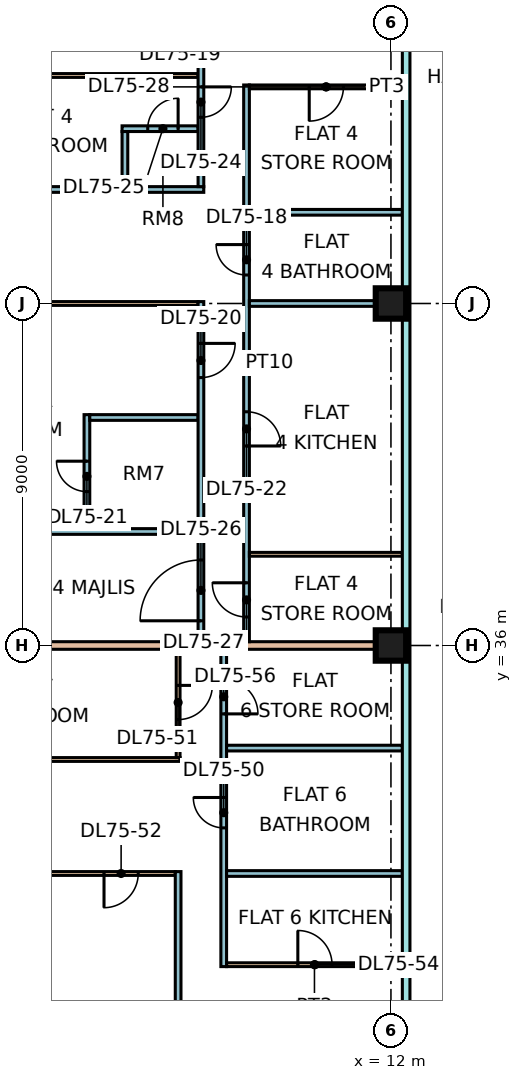
"""IFC4 building model, lengths in metres.
Left out: names, types, materials, properties, quantities, classifications, styles, units other than length and angle.
Written with IfcOpenShell. Run it as: python <this file> out.ifc"""

import sys

from ifc_helpers import new_model, si_unit, direction, frame, frame_2d, origin, origin_2d, place, context, subcontext, project, spatial, rectangle, extrude, element, fill, save


model = new_model("IFC4")
c1 = context("Model", 3, precision=1e-05, world=origin(), true_north=direction((0.0, 1.0)))
c2 = subcontext(c1, "Body", "Model", "MODEL_VIEW")
j1 = project(units=[si_unit("LENGTHUNIT", "METRE"), si_unit("PLANEANGLEUNIT", "RADIAN")], contexts=[c1])
p1 = place(None, origin())
s1 = spatial("IfcSite", under=j1, at=p1, CompositionType="ELEMENT")
p2 = place(p1, origin())
s2 = spatial("IfcBuilding", under=s1, at=p2, CompositionType="ELEMENT")
p3 = place(p2, frame((0.0, 0.0, 318.4)))
s3 = spatial("IfcBuildingStorey", under=s2, at=p3, CompositionType="ELEMENT", Elevation=318.4)
for number, where, z_axis, x_axis in (
    (1, (12.0, 36.0, 0.0), (0.0, 0.0, 1.0), (1.0, 0.0, 0.0)),
    (2, (12.0, 45.0, 0.0), (0.0, 0.0, 1.0), (1.0, 0.0, 0.0)),
):
    element("IfcColumn", number, at=place(p3, frame(where, z_axis=z_axis, x_axis=x_axis)), inside=s3, PredefinedType="COLUMN", context=c2, shape_type="SweptSolid", body=[
        extrude(rectangle(XDim=0.8, YDim=0.8, at=origin_2d()), origin(), (0.0, 0.0, 1.0), 3.75),
    ])
p4 = place(p3, frame((-1.351, 51.0, 0.0), z_axis=(0.0, 0.0, 1.0), x_axis=(1.0, 0.0, 0.0)))
e3 = element("IfcWall", 3, at=p4, inside=s3, PredefinedType="PARTITIONING", context=c2, shape_type="SweptSolid", body=[
    extrude(rectangle(XDim=8.276, YDim=0.1, at=frame_2d((4.138, 0.0))), origin(), (0.0, 0.0, 1.0), 3.3),
])
p5 = place(p3, frame((-1.35, 30.0, 0.0), z_axis=(0.0, 0.0, 1.0), x_axis=(1.0, 0.0, 0.0)))
e4 = element("IfcWall", 4, at=p5, inside=s3, PredefinedType="PARTITIONING", context=c2, shape_type="SweptSolid", body=[
    extrude(rectangle(XDim=7.675, YDim=0.1, at=frame_2d((3.837, 0.0))), origin(), (0.0, 0.0, 1.0), 3.3),
])
p6 = place(p5, frame((5.8, 0.0, 0.0)))
e5 = element("IfcOpeningElement", 5, at=p6, cuts=e4, PredefinedType="OPENING", context=c2, shape_type="SweptSolid", body=[
    extrude(rectangle(XDim=0.9, YDim=2.1, at=frame_2d((0.45, 1.05))), frame((0.0, 0.06, 0.0), z_axis=(0.0, -1.0, 0.0), x_axis=(1.0, 0.0, 0.0)), (0.0, 0.0, 1.0), 0.12),
])
p7 = place(p3, frame((-1.35, 33.0, 0.0), z_axis=(0.0, 0.0, 1.0), x_axis=(1.0, 0.0, 0.0)))
e6 = element("IfcWall", 6, at=p7, inside=s3, PredefinedType="PARTITIONING", context=c2, shape_type="SweptSolid", body=[
    extrude(rectangle(XDim=7.8, YDim=0.1, at=frame_2d((3.9, 0.0))), origin(), (0.0, 0.0, 1.0), 3.3),
])
p8 = place(p3, frame((0.0, 36.0, 0.0), z_axis=(0.0, 0.0, 1.0), x_axis=(1.0, 0.0, 0.0)))
e7 = element("IfcWall", 7, at=p8, inside=s3, PredefinedType="PARTITIONING", context=c2, shape_type="SweptSolid", body=[
    extrude(rectangle(XDim=12.3, YDim=0.2, at=frame_2d((6.15, 0.0))), origin(), (0.0, 0.0, 1.0), 3.3),
])
p9 = place(p3, frame((0.0, 48.0, 0.0), z_axis=(0.0, 0.0, 1.0), x_axis=(1.0, 0.0, 0.0)))
e8 = element("IfcWall", 8, at=p9, inside=s3, PredefinedType="PARTITIONING", context=c2, shape_type="SweptSolid", body=[
    extrude(rectangle(XDim=7.075, YDim=0.15, at=frame_2d((3.538, 0.0))), origin(), (0.0, 0.0, 1.0), 3.3),
])
p10 = place(p3, frame((0.074, 39.0, 0.0), z_axis=(0.0, 0.0, 1.0), x_axis=(1.0, 0.0, 0.0)))
e9 = element("IfcWall", 9, at=p10, inside=s3, PredefinedType="PARTITIONING", context=c2, shape_type="SweptSolid", body=[
    extrude(rectangle(XDim=6.851, YDim=0.15, at=frame_2d((3.426, 0.0))), origin(), (0.0, 0.0, 1.0), 3.3),
])
p11 = place(p3, frame((0.074, 45.0, 0.0), z_axis=(0.0, 0.0, 1.0), x_axis=(1.0, 0.0, 0.0)))
e10 = element("IfcWall", 10, at=p11, inside=s3, PredefinedType="PARTITIONING", context=c2, shape_type="SweptSolid", body=[
    extrude(rectangle(XDim=6.851, YDim=0.1, at=frame_2d((3.426, 0.0))), origin(), (0.0, 0.0, 1.0), 3.3),
])
p12 = place(p3, frame((4.0, 39.075, 0.0), z_axis=(0.0, 0.0, 1.0), x_axis=(0.0, 1.0, 0.0)))
e11 = element("IfcWall", 11, at=p12, inside=s3, PredefinedType="PARTITIONING", context=c2, shape_type="SweptSolid", body=[
    extrude(rectangle(XDim=3.0, YDim=0.15, at=frame_2d((1.5, 0.0))), origin(), (0.0, 0.0, 1.0), 3.3),
])
p13 = place(p12, frame((0.975, 0.0, 0.0)))
e12 = element("IfcOpeningElement", 12, at=p13, cuts=e11, PredefinedType="OPENING", context=c2, shape_type="SweptSolid", body=[
    extrude(rectangle(XDim=0.8, YDim=2.1, at=frame_2d((0.4, 1.05))), frame((0.0, 0.085, 0.0), z_axis=(0.0, -1.0, 0.0), x_axis=(1.0, 0.0, 0.0)), (0.0, 0.0, 1.0), 0.17),
])
p14 = place(p3, frame((4.075, 42.0, 0.0), z_axis=(0.0, 0.0, 1.0), x_axis=(1.0, 0.0, 0.0)))
e13 = element("IfcWall", 13, at=p14, inside=s3, PredefinedType="PARTITIONING", context=c2, shape_type="SweptSolid", body=[
    extrude(rectangle(XDim=2.85, YDim=0.15, at=frame_2d((1.425, 0.0))), origin(), (0.0, 0.0, 1.0), 3.3),
])
p15 = place(p3, frame((4.925, 49.6, 0.0), z_axis=(0.0, 0.0, 1.0), x_axis=(1.0, 0.0, 0.0)))
e14 = element("IfcWall", 14, at=p15, inside=s3, PredefinedType="PARTITIONING", context=c2, shape_type="SweptSolid", body=[
    extrude(rectangle(XDim=2.0, YDim=0.15, at=frame_2d((1.0, 0.0))), origin(), (0.0, 0.0, 1.0), 3.3),
])
p16 = place(p15, frame((0.675, 0.0, 0.0)))
e15 = element("IfcOpeningElement", 15, at=p16, cuts=e14, PredefinedType="OPENING", context=c2, shape_type="SweptSolid", body=[
    extrude(rectangle(XDim=0.8, YDim=2.1, at=frame_2d((0.4, 1.05))), frame((0.0, 0.085, 0.0), z_axis=(0.0, -1.0, 0.0), x_axis=(1.0, 0.0, 0.0)), (0.0, 0.0, 1.0), 0.17),
])
p17 = place(p3, frame((5.0, 48.075, 0.0), z_axis=(0.0, 0.0, 1.0), x_axis=(0.0, 1.0, 0.0)))
e16 = element("IfcWall", 16, at=p17, inside=s3, PredefinedType="PARTITIONING", context=c2, shape_type="SweptSolid", body=[
    extrude(rectangle(XDim=1.45, YDim=0.15, at=frame_2d((0.725, 0.0))), origin(), (0.0, 0.0, 1.0), 3.3),
])
p18 = place(p3, frame((6.4, 22.5, 0.0), z_axis=(0.0, 0.0, 1.0), x_axis=(0.0, 1.0, 0.0)))
e17 = element("IfcWall", 17, at=p18, inside=s3, PredefinedType="PARTITIONING", context=c2, shape_type="SweptSolid", body=[
    extrude(rectangle(XDim=7.55, YDim=0.15, at=frame_2d((3.775, 0.0))), origin(), (0.0, 0.0, 1.0), 3.3),
])
p19 = place(p3, frame((6.4, 33.05, 0.0), z_axis=(0.0, 0.0, 1.0), x_axis=(0.0, 1.0, 0.0)))
e18 = element("IfcWall", 18, at=p19, inside=s3, PredefinedType="PARTITIONING", context=c2, shape_type="SweptSolid", body=[
    extrude(rectangle(XDim=2.85, YDim=0.1, at=frame_2d((1.425, 0.0))), origin(), (0.0, 0.0, 1.0), 3.3),
])
p20 = place(p19, frame((1.0, 0.0, 0.0)))
e19 = element("IfcOpeningElement", 19, at=p20, cuts=e18, PredefinedType="OPENING", context=c2, shape_type="SweptSolid", body=[
    extrude(rectangle(XDim=0.9, YDim=2.1, at=frame_2d((0.45, 1.05))), frame((0.0, 0.06, 0.0), z_axis=(0.0, -1.0, 0.0), x_axis=(1.0, 0.0, 0.0)), (0.0, 0.0, 1.0), 0.12),
])
p21 = place(p3, frame((7.0, 36.1, 0.0), z_axis=(0.0, 0.0, 1.0), x_axis=(0.0, 1.0, 0.0)))
e20 = element("IfcWall", 20, at=p21, inside=s3, PredefinedType="PARTITIONING", context=c2, shape_type="SweptSolid", body=[
    extrude(rectangle(XDim=8.95, YDim=0.15, at=frame_2d((4.475, 0.0))), origin(), (0.0, 0.0, 1.0), 3.3),
])
p22 = place(p21, frame((6.95, 0.0, 0.0)))
e21 = element("IfcOpeningElement", 21, at=p22, cuts=e20, PredefinedType="OPENING", context=c2, shape_type="SweptSolid", body=[
    extrude(rectangle(XDim=0.9, YDim=2.1, at=frame_2d((0.45, 1.05))), frame((0.0, 0.085, 0.0), z_axis=(0.0, -1.0, 0.0), x_axis=(1.0, 0.0, 0.0)), (0.0, 0.0, 1.0), 0.17),
])
p23 = place(p21, frame((0.55, 0.0, 0.0)))
e22 = element("IfcOpeningElement", 22, at=p23, cuts=e20, PredefinedType="OPENING", context=c2, shape_type="SweptSolid", body=[
    extrude(rectangle(XDim=1.6, YDim=2.1, at=frame_2d((0.8, 1.05))), frame((0.0, 0.085, 0.0), z_axis=(0.0, -1.0, 0.0), x_axis=(1.0, 0.0, 0.0)), (0.0, 0.0, 1.0), 0.17),
])
p24 = place(p3, frame((7.0, 48.075, 0.0), z_axis=(0.0, 0.0, 1.0), x_axis=(0.0, 1.0, 0.0)))
e23 = element("IfcWall", 23, at=p24, inside=s3, PredefinedType="PARTITIONING", context=c2, shape_type="SweptSolid", body=[
    extrude(rectangle(XDim=7.275, YDim=0.15, at=frame_2d((3.638, 0.0))), origin(), (0.0, 0.0, 1.0), 3.3),
])
p25 = place(p24, frame((3.975, 0.0, 0.0)))
e24 = element("IfcOpeningElement", 24, at=p25, cuts=e23, PredefinedType="OPENING", context=c2, shape_type="SweptSolid", body=[
    extrude(rectangle(XDim=0.9, YDim=2.1, at=frame_2d((0.45, 1.05))), frame((0.0, 0.085, 0.0), z_axis=(0.0, -1.0, 0.0), x_axis=(1.0, 0.0, 0.0)), (0.0, 0.0, 1.0), 0.17),
])
p26 = place(p24, frame((1.825, 0.0, 0.0)))
e25 = element("IfcOpeningElement", 25, at=p26, cuts=e23, PredefinedType="OPENING", context=c2, shape_type="SweptSolid", body=[
    extrude(rectangle(XDim=0.8, YDim=2.1, at=frame_2d((0.4, 1.05))), frame((0.0, 0.085, 0.0), z_axis=(0.0, -1.0, 0.0), x_axis=(1.0, 0.0, 0.0)), (0.0, 0.0, 1.0), 0.17),
])
p27 = place(p3, frame((7.6, 27.55, 0.0), z_axis=(0.0, 0.0, 1.0), x_axis=(0.0, 1.0, 0.0)))
e26 = element("IfcWall", 26, at=p27, inside=s3, PredefinedType="PARTITIONING", context=c2, shape_type="SweptSolid", body=[
    extrude(rectangle(XDim=8.35, YDim=0.15, at=frame_2d((4.175, 0.0))), origin(), (0.0, 0.0, 1.0), 3.3),
])
p28 = place(p27, frame((3.65, 0.0, 0.0)))
e27 = element("IfcOpeningElement", 27, at=p28, cuts=e26, PredefinedType="OPENING", context=c2, shape_type="SweptSolid", body=[
    extrude(rectangle(XDim=0.8, YDim=2.1, at=frame_2d((0.4, 1.05))), frame((0.0, 0.085, 0.0), z_axis=(0.0, -1.0, 0.0), x_axis=(1.0, 0.0, 0.0)), (0.0, 0.0, 1.0), 0.17),
])
p29 = place(p27, frame((6.65, 0.0, 0.0)))
e28 = element("IfcOpeningElement", 28, at=p29, cuts=e26, PredefinedType="OPENING", context=c2, shape_type="SweptSolid", body=[
    extrude(rectangle(XDim=0.9, YDim=2.1, at=frame_2d((0.45, 1.05))), frame((0.0, 0.085, 0.0), z_axis=(0.0, -1.0, 0.0), x_axis=(1.0, 0.0, 0.0)), (0.0, 0.0, 1.0), 0.17),
])
p30 = place(p3, frame((7.675, 27.6, 0.0), z_axis=(0.0, 0.0, 1.0), x_axis=(1.0, 0.0, 0.0)))
e29 = element("IfcWall", 29, at=p30, inside=s3, PredefinedType="PARTITIONING", context=c2, shape_type="SweptSolid", body=[
    extrude(rectangle(XDim=4.625, YDim=0.1, at=frame_2d((2.312, 0.0))), origin(), (0.0, 0.0, 1.0), 3.3),
])
p31 = place(p30, frame((1.875, 0.0, 0.0)))
e30 = element("IfcOpeningElement", 30, at=p31, cuts=e29, PredefinedType="OPENING", context=c2, shape_type="SweptSolid", body=[
    extrude(rectangle(XDim=0.9, YDim=2.1, at=frame_2d((0.45, 1.05))), frame((0.0, 0.06, 0.0), z_axis=(0.0, -1.0, 0.0), x_axis=(1.0, 0.0, 0.0)), (0.0, 0.0, 1.0), 0.12),
])
for number, where, z_axis, x_axis in (
    (31, (7.675, 30.0, 0.0), (0.0, 0.0, 1.0), (1.0, 0.0, 0.0)),
    (32, (7.675, 33.3, 0.0), (0.0, 0.0, 1.0), (1.0, 0.0, 0.0)),
):
    element("IfcWall", number, at=place(p3, frame(where, z_axis=z_axis, x_axis=x_axis)), inside=s3, PredefinedType="PARTITIONING", context=c2, shape_type="SweptSolid", body=[
        extrude(rectangle(XDim=4.625, YDim=0.15, at=frame_2d((2.312, 0.0))), origin(), (0.0, 0.0, 1.0), 3.3),
    ])
p32 = place(p3, frame((8.2, 36.1, 0.0), z_axis=(0.0, 0.0, 1.0), x_axis=(0.0, 1.0, 0.0)))
e33 = element("IfcWall", 33, at=p32, inside=s3, PredefinedType="PARTITIONING", context=c2, shape_type="SweptSolid", body=[
    extrude(rectangle(XDim=14.65, YDim=0.15, at=frame_2d((7.325, 0.0))), origin(), (0.0, 0.0, 1.0), 3.3),
])
p33 = place(p32, frame((9.65, 0.0, 0.0)))
e34 = element("IfcOpeningElement", 34, at=p33, cuts=e33, PredefinedType="OPENING", context=c2, shape_type="SweptSolid", body=[
    extrude(rectangle(XDim=0.8, YDim=2.1, at=frame_2d((0.4, 1.05))), frame((0.0, 0.085, 0.0), z_axis=(0.0, -1.0, 0.0), x_axis=(1.0, 0.0, 0.0)), (0.0, 0.0, 1.0), 0.17),
])
p34 = place(p32, frame((5.15, 0.0, 0.0)))
e35 = element("IfcOpeningElement", 35, at=p34, cuts=e33, PredefinedType="OPENING", context=c2, shape_type="SweptSolid", body=[
    extrude(rectangle(XDim=0.9, YDim=2.1, at=frame_2d((0.45, 1.05))), frame((0.0, 0.085, 0.0), z_axis=(0.0, -1.0, 0.0), x_axis=(1.0, 0.0, 0.0)), (0.0, 0.0, 1.0), 0.17),
])
p35 = place(p32, frame((0.65, 0.0, 0.0)))
e36 = element("IfcOpeningElement", 36, at=p35, cuts=e33, PredefinedType="OPENING", context=c2, shape_type="SweptSolid", body=[
    extrude(rectangle(XDim=0.9, YDim=2.1, at=frame_2d((0.45, 1.05))), frame((0.0, 0.085, 0.0), z_axis=(0.0, -1.0, 0.0), x_axis=(1.0, 0.0, 0.0)), (0.0, 0.0, 1.0), 0.17),
])
p36 = place(p3, frame((8.275, 38.4, 0.0), z_axis=(0.0, 0.0, 1.0), x_axis=(1.0, 0.0, 0.0)))
e37 = element("IfcWall", 37, at=p36, inside=s3, PredefinedType="PARTITIONING", context=c2, shape_type="SweptSolid", body=[
    extrude(rectangle(XDim=4.025, YDim=0.1, at=frame_2d((2.013, 0.0))), origin(), (0.0, 0.0, 1.0), 3.3),
])
for number, where, z_axis, x_axis in (
    (38, (8.275, 45.0, 0.0), (0.0, 0.0, 1.0), (1.0, 0.0, 0.0)),
    (39, (8.275, 47.4, 0.0), (0.0, 0.0, 1.0), (1.0, 0.0, 0.0)),
):
    element("IfcWall", number, at=place(p3, frame(where, z_axis=z_axis, x_axis=x_axis)), inside=s3, PredefinedType="PARTITIONING", context=c2, shape_type="SweptSolid", body=[
        extrude(rectangle(XDim=4.025, YDim=0.15, at=frame_2d((2.013, 0.0))), origin(), (0.0, 0.0, 1.0), 3.3),
    ])
p37 = place(p3, frame((8.275, 50.7, 0.0), z_axis=(0.0, 0.0, 1.0), x_axis=(1.0, 0.0, 0.0)))
e40 = element("IfcWall", 40, at=p37, inside=s3, PredefinedType="PARTITIONING", context=c2, shape_type="SweptSolid", body=[
    extrude(rectangle(XDim=4.025, YDim=0.1, at=frame_2d((2.013, 0.0))), origin(), (0.0, 0.0, 1.0), 3.3),
])
p38 = place(p37, frame((1.575, 0.0, 0.0)))
e41 = element("IfcOpeningElement", 41, at=p38, cuts=e40, PredefinedType="OPENING", context=c2, shape_type="SweptSolid", body=[
    extrude(rectangle(XDim=0.9, YDim=2.1, at=frame_2d((0.45, 1.05))), frame((0.0, 0.06, 0.0), z_axis=(0.0, -1.0, 0.0), x_axis=(1.0, 0.0, 0.0)), (0.0, 0.0, 1.0), 0.12),
])
p39 = place(p3, frame((12.4, 20.0, 0.0), z_axis=(0.0, 0.0, 1.0), x_axis=(0.0, 1.0, 0.0)))
e42 = element("IfcWall", 42, at=p39, inside=s3, PredefinedType="PARTITIONING", context=c2, shape_type="SweptSolid", body=[
    extrude(rectangle(XDim=33.926, YDim=0.2, at=frame_2d((16.963, 0.0))), origin(), (0.0, 0.0, 1.0), 3.3),
])
p40 = place(p39, frame((31.8, 0.0, 0.0)))
e43 = element("IfcOpeningElement", 43, at=p40, cuts=e42, PredefinedType="OPENING", context=c2, shape_type="SweptSolid", body=[
    extrude(rectangle(XDim=1.0, YDim=2.1, at=frame_2d((0.5, 1.05))), frame((0.0, 0.11, 0.0), z_axis=(0.0, -1.0, 0.0), x_axis=(1.0, 0.0, 0.0)), (0.0, 0.0, 1.0), 0.22),
])
p41 = place(p39, frame((0.6, 0.0, 0.0)))
e44 = element("IfcOpeningElement", 44, at=p41, cuts=e42, PredefinedType="OPENING", context=c2, shape_type="SweptSolid", body=[
    extrude(rectangle(XDim=1.2, YDim=2.1, at=frame_2d((0.6, 1.05))), frame((0.0, 0.11, 0.0), z_axis=(0.0, -1.0, 0.0), x_axis=(1.0, 0.0, 0.0)), (0.0, 0.0, 1.0), 0.22),
])
p42 = place(p39, frame((4.5, 0.0, 0.0)))
e45 = element("IfcOpeningElement", 45, at=p42, cuts=e42, PredefinedType="OPENING", context=c2, shape_type="SweptSolid", body=[
    extrude(rectangle(XDim=1.0, YDim=2.1, at=frame_2d((0.5, 1.05))), frame((0.0, 0.11, 0.0), z_axis=(0.0, -1.0, 0.0), x_axis=(1.0, 0.0, 0.0)), (0.0, 0.0, 1.0), 0.22),
])
p43 = place(p33, frame((0.8, 0.0, 0.0), z_axis=(0.0, 0.0, 1.0), x_axis=(-1.0, 0.0, 0.0)))
e46 = element("IfcDoor", 46, at=p43, inside=s3, OperationType="SINGLE_SWING_RIGHT", PredefinedType="DOOR", context=c2, shape_type="SweptSolid", body=[
    extrude(rectangle(XDim=0.8, YDim=2.1, at=frame_2d((0.4, 1.05))), frame((0.0, 0.025, 0.0), z_axis=(0.0, -1.0, 0.0), x_axis=(1.0, 0.0, 0.0)), (0.0, 0.0, 1.0), 0.05),
])
fill(e34, e46)
p44 = place(p22, origin())
e47 = element("IfcDoor", 47, at=p44, inside=s3, OperationType="SINGLE_SWING_RIGHT", PredefinedType="DOOR", context=c2, shape_type="SweptSolid", body=[
    extrude(rectangle(XDim=0.9, YDim=2.1, at=frame_2d((0.45, 1.05))), frame((0.0, 0.025, 0.0), z_axis=(0.0, -1.0, 0.0), x_axis=(1.0, 0.0, 0.0)), (0.0, 0.0, 1.0), 0.05),
])
fill(e21, e47)
p45 = place(p13, frame((0.8, 0.0, 0.0), z_axis=(0.0, 0.0, 1.0), x_axis=(-1.0, 0.0, 0.0)))
e48 = element("IfcDoor", 48, at=p45, inside=s3, OperationType="SINGLE_SWING_RIGHT", PredefinedType="DOOR", context=c2, shape_type="SweptSolid", body=[
    extrude(rectangle(XDim=0.8, YDim=2.1, at=frame_2d((0.4, 1.05))), frame((0.0, 0.025, 0.0), z_axis=(0.0, -1.0, 0.0), x_axis=(1.0, 0.0, 0.0)), (0.0, 0.0, 1.0), 0.05),
])
fill(e12, e48)
p46 = place(p34, frame((0.9, 0.0, 0.0), z_axis=(0.0, 0.0, 1.0), x_axis=(-1.0, 0.0, 0.0)))
e49 = element("IfcDoor", 49, at=p46, inside=s3, OperationType="SINGLE_SWING_LEFT", PredefinedType="DOOR", context=c2, shape_type="SweptSolid", body=[
    extrude(rectangle(XDim=0.9, YDim=2.1, at=frame_2d((0.45, 1.05))), frame((0.0, 0.025, 0.0), z_axis=(0.0, -1.0, 0.0), x_axis=(1.0, 0.0, 0.0)), (0.0, 0.0, 1.0), 0.05),
])
fill(e35, e49)
p47 = place(p26, origin())
e50 = element("IfcDoor", 50, at=p47, inside=s3, OperationType="SINGLE_SWING_RIGHT", PredefinedType="DOOR", context=c2, shape_type="SweptSolid", body=[
    extrude(rectangle(XDim=0.8, YDim=2.1, at=frame_2d((0.4, 1.05))), frame((0.0, 0.025, 0.0), z_axis=(0.0, -1.0, 0.0), x_axis=(1.0, 0.0, 0.0)), (0.0, 0.0, 1.0), 0.05),
])
fill(e25, e50)
p48 = place(p16, frame((0.8, 0.0, 0.0), z_axis=(0.0, 0.0, 1.0), x_axis=(-1.0, 0.0, 0.0)))
e51 = element("IfcDoor", 51, at=p48, inside=s3, OperationType="SINGLE_SWING_RIGHT", PredefinedType="DOOR", context=c2, shape_type="SweptSolid", body=[
    extrude(rectangle(XDim=0.8, YDim=2.1, at=frame_2d((0.4, 1.05))), frame((0.0, 0.025, 0.0), z_axis=(0.0, -1.0, 0.0), x_axis=(1.0, 0.0, 0.0)), (0.0, 0.0, 1.0), 0.05),
])
fill(e15, e51)
p49 = place(p23, origin())
e52 = element("IfcDoor", 52, at=p49, inside=s3, OperationType="DOUBLE_DOOR_SINGLE_SWING", PredefinedType="DOOR", context=c2, shape_type="SweptSolid", body=[
    extrude(rectangle(XDim=1.6, YDim=2.1, at=frame_2d((0.8, 1.05))), frame((0.0, 0.025, 0.0), z_axis=(0.0, -1.0, 0.0), x_axis=(1.0, 0.0, 0.0)), (0.0, 0.0, 1.0), 0.05),
])
fill(e22, e52)
p50 = place(p35, frame((0.9, 0.0, 0.0), z_axis=(0.0, 0.0, 1.0), x_axis=(-1.0, 0.0, 0.0)))
e53 = element("IfcDoor", 53, at=p50, inside=s3, OperationType="SINGLE_SWING_RIGHT", PredefinedType="DOOR", context=c2, shape_type="SweptSolid", body=[
    extrude(rectangle(XDim=0.9, YDim=2.1, at=frame_2d((0.45, 1.05))), frame((0.0, 0.025, 0.0), z_axis=(0.0, -1.0, 0.0), x_axis=(1.0, 0.0, 0.0)), (0.0, 0.0, 1.0), 0.05),
])
fill(e36, e53)
p51 = place(p38, frame((0.9, 0.0, 0.0), z_axis=(0.0, 0.0, 1.0), x_axis=(-1.0, 0.0, 0.0)))
e54 = element("IfcDoor", 54, at=p51, inside=s3, OperationType="SINGLE_SWING_LEFT", PredefinedType="DOOR", context=c2, shape_type="SweptSolid", body=[
    extrude(rectangle(XDim=0.9, YDim=2.1, at=frame_2d((0.45, 1.05))), frame((0.0, 0.025, 0.0), z_axis=(0.0, -1.0, 0.0), x_axis=(1.0, 0.0, 0.0)), (0.0, 0.0, 1.0), 0.05),
])
fill(e41, e54)
p52 = place(p28, frame((0.8, 0.0, 0.0), z_axis=(0.0, 0.0, 1.0), x_axis=(-1.0, 0.0, 0.0)))
e55 = element("IfcDoor", 55, at=p52, inside=s3, OperationType="SINGLE_SWING_RIGHT", PredefinedType="DOOR", context=c2, shape_type="SweptSolid", body=[
    extrude(rectangle(XDim=0.8, YDim=2.1, at=frame_2d((0.4, 1.05))), frame((0.0, 0.025, 0.0), z_axis=(0.0, -1.0, 0.0), x_axis=(1.0, 0.0, 0.0)), (0.0, 0.0, 1.0), 0.05),
])
fill(e27, e55)
p53 = place(p20, origin())
e56 = element("IfcDoor", 56, at=p53, inside=s3, OperationType="SINGLE_SWING_RIGHT", PredefinedType="DOOR", context=c2, shape_type="SweptSolid", body=[
    extrude(rectangle(XDim=0.9, YDim=2.1, at=frame_2d((0.45, 1.05))), frame((0.0, 0.025, 0.0), z_axis=(0.0, -1.0, 0.0), x_axis=(1.0, 0.0, 0.0)), (0.0, 0.0, 1.0), 0.05),
])
fill(e19, e56)
p54 = place(p6, frame((0.9, 0.0, 0.0), z_axis=(0.0, 0.0, 1.0), x_axis=(-1.0, 0.0, 0.0)))
e57 = element("IfcDoor", 57, at=p54, inside=s3, OperationType="SINGLE_SWING_LEFT", PredefinedType="DOOR", context=c2, shape_type="SweptSolid", body=[
    extrude(rectangle(XDim=0.9, YDim=2.1, at=frame_2d((0.45, 1.05))), frame((0.0, 0.025, 0.0), z_axis=(0.0, -1.0, 0.0), x_axis=(1.0, 0.0, 0.0)), (0.0, 0.0, 1.0), 0.05),
])
fill(e5, e57)
p55 = place(p31, origin())
e58 = element("IfcDoor", 58, at=p55, inside=s3, OperationType="SINGLE_SWING_LEFT", PredefinedType="DOOR", context=c2, shape_type="SweptSolid", body=[
    extrude(rectangle(XDim=0.9, YDim=2.1, at=frame_2d((0.45, 1.05))), frame((0.0, 0.025, 0.0), z_axis=(0.0, -1.0, 0.0), x_axis=(1.0, 0.0, 0.0)), (0.0, 0.0, 1.0), 0.05),
])
fill(e30, e58)
p56 = place(p29, frame((0.9, 0.0, 0.0), z_axis=(0.0, 0.0, 1.0), x_axis=(-1.0, 0.0, 0.0)))
e59 = element("IfcDoor", 59, at=p56, inside=s3, OperationType="SINGLE_SWING_LEFT", PredefinedType="DOOR", context=c2, shape_type="SweptSolid", body=[
    extrude(rectangle(XDim=0.9, YDim=2.1, at=frame_2d((0.45, 1.05))), frame((0.0, 0.025, 0.0), z_axis=(0.0, -1.0, 0.0), x_axis=(1.0, 0.0, 0.0)), (0.0, 0.0, 1.0), 0.05),
])
fill(e28, e59)
save(model, sys.argv[1])
